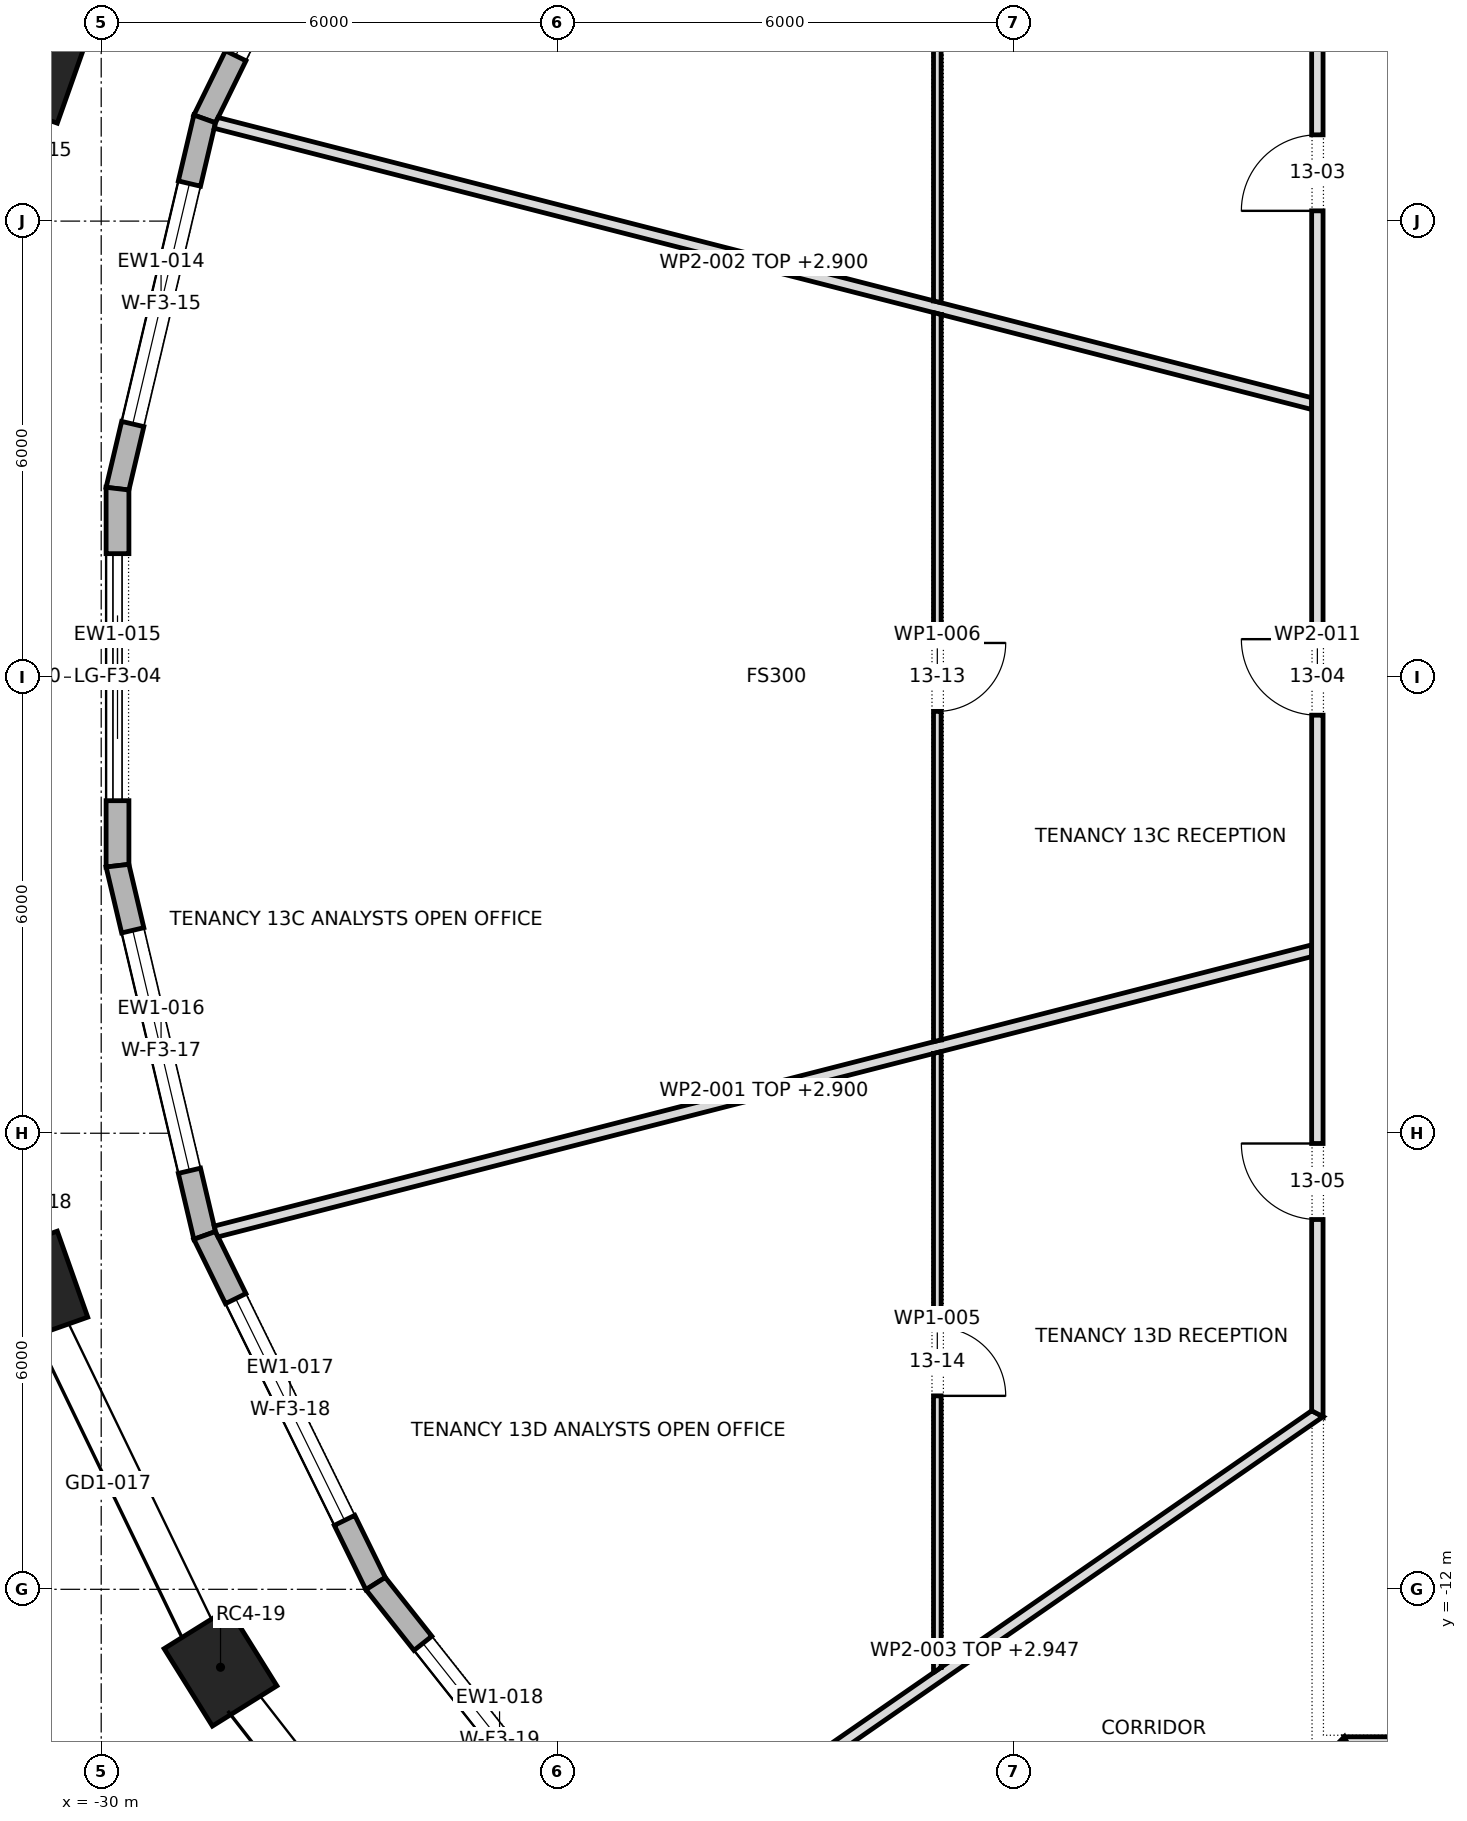
"""IFC4 building model, lengths in metres.
Left out: names, types, materials, properties, quantities, classifications, styles, units other than length and angle.
Written with IfcOpenShell. Run it as: python <this file> out.ifc"""

import sys

from ifc_helpers import new_model, si_unit, direction, frame, frame_2d, origin, origin_2d, place, context, subcontext, project, spatial, polyline, rectangle, outline, extrude, element, fill, save


model = new_model("IFC4")
c1 = context("Model", 3, precision=1e-05, world=origin(), true_north=direction((0.0, 1.0)))
c2 = subcontext(c1, "Body", "Model", "MODEL_VIEW")
j1 = project(units=[si_unit("LENGTHUNIT", "METRE"), si_unit("PLANEANGLEUNIT", "RADIAN")], contexts=[c1])
p1 = place(None, origin())
s1 = spatial("IfcSite", under=j1, at=p1, CompositionType="ELEMENT")
p2 = place(p1, origin())
s2 = spatial("IfcBuilding", under=s1, at=p2, CompositionType="ELEMENT")
p3 = place(p2, frame((0.0, 0.0, 198.9)))
s3 = spatial("IfcBuildingStorey", under=s2, at=p3, CompositionType="ELEMENT", Elevation=198.9)
for number, where, z_axis, x_axis in (
    (1, (-30.849, 8.021, 0.0), (0.0, 0.0, 1.0), (-0.334, -0.943, 0.0)),
    (2, (-30.849, -8.021, 0.0), (0.0, 0.0, 1.0), (0.334, -0.943, 0.0)),
    (3, (-28.43, -13.025, 0.0), (0.0, 0.0, 1.0), (0.529, -0.849, 0.0)),
):
    element("IfcColumn", number, at=place(p3, frame(where, z_axis=z_axis, x_axis=x_axis)), inside=s3, PredefinedType="COLUMN", context=c2, shape_type="SweptSolid", body=[
        extrude(rectangle(XDim=1.2, YDim=1.0, at=origin_2d()), origin(), (0.0, 0.0, 1.0), 4.0),
    ])
p4 = place(p3, frame((-26.39, 11.924, 0.0), z_axis=(0.0, 0.0, 1.0), x_axis=(-0.440694221881, -0.897657285829, 0.0)))
e4 = element("IfcWall", 4, at=p4, inside=s3, PredefinedType="STANDARD", context=c2, shape_type="SweptSolid", body=[
    extrude(outline(polyline([(-0.016, -0.15), (5.119, -0.15), (5.085, 0.15), (0.016, 0.15), (-0.016, -0.15)])), origin(), (0.0, 0.0, 1.0), 3.7),
])
p5 = place(p4, frame((0.926, 0.0, 0.6)))
e5 = element("IfcOpeningElement", 5, at=p5, cuts=e4, PredefinedType="OPENING", context=c2, shape_type="SweptSolid", body=[
    extrude(rectangle(XDim=3.25, YDim=2.65, at=frame_2d((1.625, 1.325))), frame((0.0, 0.162, 0.0), z_axis=(0.0, -1.0, 0.0), x_axis=(1.0, 0.0, 0.0)), (0.0, 0.0, 1.0), 0.324),
])
p6 = place(p3, frame((-28.639, 7.344, 0.0), z_axis=(0.0, 0.0, 1.0), x_axis=(-0.229455912692, -0.97331905567, 0.0)))
e6 = element("IfcWall", 6, at=p6, inside=s3, PredefinedType="STANDARD", context=c2, shape_type="SweptSolid", body=[
    extrude(outline(polyline([(-0.017, -0.15), (5.015, -0.15), (4.98, 0.15), (0.017, 0.15), (-0.017, -0.15)])), origin(), (0.0, 0.0, 1.0), 3.7),
])
p7 = place(p6, frame((0.874, 0.0, 0.6)))
e7 = element("IfcOpeningElement", 7, at=p7, cuts=e6, PredefinedType="OPENING", context=c2, shape_type="SweptSolid", body=[
    extrude(rectangle(XDim=3.25, YDim=2.65, at=frame_2d((1.625, 1.325))), frame((0.0, 0.162, 0.0), z_axis=(0.0, -1.0, 0.0), x_axis=(1.0, 0.0, 0.0)), (0.0, 0.0, 1.0), 0.324),
])
p8 = place(p3, frame((-29.785, 2.48, 0.0), z_axis=(0.0, 0.0, 1.0), x_axis=(0.0, -1.0, 0.0)))
e8 = element("IfcWall", 8, at=p8, inside=s3, PredefinedType="STANDARD", context=c2, shape_type="SweptSolid", body=[
    extrude(outline(polyline([(-0.017, -0.15), (4.977, -0.15), (4.943, 0.15), (0.017, 0.15), (-0.017, -0.15)])), origin(), (0.0, 0.0, 1.0), 3.7),
])
p9 = place(p8, frame((0.855, 0.0, 0.0)))
e9 = element("IfcOpeningElement", 9, at=p9, cuts=e8, PredefinedType="OPENING", context=c2, shape_type="SweptSolid", body=[
    extrude(rectangle(XDim=3.25, YDim=3.25, at=frame_2d((1.625, 1.625))), frame((0.0, 0.162, 0.0), z_axis=(0.0, -1.0, 0.0), x_axis=(1.0, 0.0, 0.0)), (0.0, 0.0, 1.0), 0.324),
])
p10 = place(p3, frame((-29.785, -2.48, 0.0), z_axis=(0.0, 0.0, 1.0), x_axis=(0.229455912692, -0.97331905567, 0.0)))
e10 = element("IfcWall", 10, at=p10, inside=s3, PredefinedType="STANDARD", context=c2, shape_type="SweptSolid", body=[
    extrude(outline(polyline([(-0.017, -0.15), (5.014, -0.15), (4.981, 0.15), (0.017, 0.15), (-0.017, -0.15)])), origin(), (0.0, 0.0, 1.0), 3.7),
])
p11 = place(p10, frame((0.874, 0.0, 0.6)))
e11 = element("IfcOpeningElement", 11, at=p11, cuts=e10, PredefinedType="OPENING", context=c2, shape_type="SweptSolid", body=[
    extrude(rectangle(XDim=3.25, YDim=2.65, at=frame_2d((1.625, 1.325))), frame((0.0, 0.162, 0.0), z_axis=(0.0, -1.0, 0.0), x_axis=(1.0, 0.0, 0.0)), (0.0, 0.0, 1.0), 0.324),
])
p12 = place(p3, frame((-28.639, -7.344, 0.0), z_axis=(0.0, 0.0, 1.0), x_axis=(0.440694221881, -0.897657285829, 0.0)))
e12 = element("IfcWall", 12, at=p12, inside=s3, PredefinedType="STANDARD", context=c2, shape_type="SweptSolid", body=[
    extrude(outline(polyline([(-0.017, -0.15), (5.118, -0.15), (5.086, 0.15), (0.017, 0.15), (-0.017, -0.15)])), origin(), (0.0, 0.0, 1.0), 3.7),
])
p13 = place(p12, frame((0.926, 0.0, 0.6)))
e13 = element("IfcOpeningElement", 13, at=p13, cuts=e12, PredefinedType="OPENING", context=c2, shape_type="SweptSolid", body=[
    extrude(rectangle(XDim=3.25, YDim=2.65, at=frame_2d((1.625, 1.325))), frame((0.0, 0.162, 0.0), z_axis=(0.0, -1.0, 0.0), x_axis=(1.0, 0.0, 0.0)), (0.0, 0.0, 1.0), 0.324),
])
p14 = place(p3, frame((-26.39, -11.924, 0.0), z_axis=(0.0, 0.0, 1.0), x_axis=(0.620829074232, -0.783945955145, 0.0)))
e14 = element("IfcWall", 14, at=p14, inside=s3, PredefinedType="STANDARD", context=c2, shape_type="SweptSolid", body=[
    extrude(outline(polyline([(-0.016, -0.15), (5.27, -0.15), (5.24, 0.15), (0.016, 0.15), (-0.016, -0.15)])), origin(), (0.0, 0.0, 1.0), 3.7),
])
p15 = place(p14, frame((1.003, 0.0, 0.6)))
e15 = element("IfcOpeningElement", 15, at=p15, cuts=e14, PredefinedType="OPENING", context=c2, shape_type="SweptSolid", body=[
    extrude(rectangle(XDim=3.25, YDim=2.65, at=frame_2d((1.625, 1.325))), frame((0.0, 0.162, 0.0), z_axis=(0.0, -1.0, 0.0), x_axis=(1.0, 0.0, 0.0)), (0.0, 0.0, 1.0), 0.324),
])
p16 = place(p3, frame((-28.494, -7.294, 0.0), z_axis=(0.0, 0.0, 1.0), x_axis=(0.96870063855, 0.248231893342, 0.0)))
e16 = element("IfcWall", 16, at=p16, inside=s3, PredefinedType="PARTITIONING", context=c2, shape_type="SweptSolid", body=[
    extrude(outline(polyline([(0.014, -0.075), (1.957, -0.075), (3.901, -0.075), (5.844, -0.075), (7.787, -0.075), (9.73, -0.075), (9.731, -0.073), (9.736, -0.075), (11.446, -0.075), (13.156, -0.075), (14.866, -0.075), (14.904, 0.074), (14.904, 0.075), (13.227, 0.075), (11.549, 0.075), (9.872, 0.075), (9.872, 0.073), (9.866, 0.075), (7.893, 0.075), (5.92, 0.075), (3.947, 0.075), (1.973, 0.075), (0.0, 0.075), (0.0, -0.008), (0.014, -0.075)])), origin(), (0.0, 0.0, 1.0), 2.9),
])
p17 = place(p3, frame((-28.494, 7.294, 0.0), z_axis=(0.0, 0.0, 1.0), x_axis=(0.96870063855, -0.248231893342, 0.0)))
e17 = element("IfcWall", 17, at=p17, inside=s3, PredefinedType="PARTITIONING", context=c2, shape_type="SweptSolid", body=[
    extrude(outline(polyline([(0.0, -0.075), (1.973, -0.075), (3.947, -0.075), (5.92, -0.075), (7.893, -0.075), (9.866, -0.075), (9.872, -0.073), (9.872, -0.075), (11.549, -0.075), (13.227, -0.075), (14.904, -0.075), (14.904, -0.074), (14.866, 0.075), (13.156, 0.075), (11.446, 0.075), (9.736, 0.075), (9.731, 0.073), (9.73, 0.075), (7.787, 0.075), (5.844, 0.075), (3.901, 0.075), (1.957, 0.075), (0.014, 0.075), (0.0, 0.008), (0.0, -0.075)])), origin(), (0.0, 0.0, 1.0), 2.9),
])
p18 = place(p3, frame((-23.024, -15.94, 0.0), z_axis=(0.0, 0.0, 1.0), x_axis=(0.822097241007, 0.569347105313, 0.0)))
e18 = element("IfcWall", 18, at=p18, inside=s3, PredefinedType="PARTITIONING", context=c2, shape_type="SweptSolid", body=[
    extrude(outline(polyline([(0.024, -0.075), (1.856, -0.075), (3.688, -0.075), (5.52, -0.075), (7.352, -0.075), (9.184, -0.075), (11.016, -0.075), (10.977, -0.0), (10.938, 0.075), (8.961, 0.075), (6.985, 0.075), (5.008, 0.075), (5.006, 0.072), (5.002, 0.075), (3.335, 0.075), (1.667, 0.075), (0.0, 0.075), (0.0, 0.068), (0.005, -0.002), (0.024, -0.075)])), origin(), (0.0, 0.0, 1.0), 2.947),
])
p19 = place(p3, frame((-19.0, -13.095, 0.0), z_axis=(0.0, 0.0, 1.0), x_axis=(0.0, 1.0, 0.0)))
e19 = element("IfcWall", 19, at=p19, inside=s3, PredefinedType="PARTITIONING", context=c2, shape_type="SweptSolid", body=[
    extrude(outline(polyline([(8.169, -0.05), (8.169, -0.049), (8.144, 0.05), (6.515, 0.05), (4.886, 0.05), (3.258, 0.05), (1.629, 0.05), (0.0, 0.05), (0.0, 0.049), (0.069, -0.05), (1.689, -0.05), (3.309, -0.05), (4.929, -0.05), (6.549, -0.05), (8.169, -0.05)])), origin(), (0.0, 0.0, 1.0), 3.7),
])
p20 = place(p19, frame((3.64, 0.0, 0.0)))
e20 = element("IfcOpeningElement", 20, at=p20, cuts=e19, PredefinedType="OPENING", context=c2, shape_type="SweptSolid", body=[
    extrude(rectangle(XDim=0.9, YDim=2.1, at=frame_2d((0.45, 1.05))), frame((0.0, 0.062, 0.0), z_axis=(0.0, -1.0, 0.0), x_axis=(1.0, 0.0, 0.0)), (0.0, 0.0, 1.0), 0.124),
])
p21 = place(p3, frame((-19.0, -4.796, 0.0), z_axis=(0.0, 0.0, 1.0), x_axis=(0.0, 1.0, 0.0)))
e21 = element("IfcWall", 21, at=p21, inside=s3, PredefinedType="PARTITIONING", context=c2, shape_type="SweptSolid", body=[
    extrude(outline(polyline([(0.025, -0.05), (1.934, -0.05), (3.842, -0.05), (5.75, -0.05), (7.659, -0.05), (9.567, -0.05), (9.593, 0.049), (9.593, 0.05), (7.674, 0.05), (5.756, 0.05), (3.837, 0.05), (1.918, 0.05), (0.0, 0.05), (0.0, 0.049), (0.025, -0.05)])), origin(), (0.0, 0.0, 1.0), 3.7),
])
p22 = place(p21, frame((4.346, 0.0, 0.0)))
e22 = element("IfcOpeningElement", 22, at=p22, cuts=e21, PredefinedType="OPENING", context=c2, shape_type="SweptSolid", body=[
    extrude(rectangle(XDim=0.9, YDim=2.1, at=frame_2d((0.45, 1.05))), frame((0.0, 0.062, 0.0), z_axis=(0.0, -1.0, 0.0), x_axis=(1.0, 0.0, 0.0)), (0.0, 0.0, 1.0), 0.124),
])
p23 = place(p3, frame((-19.0, 4.926, 0.0), z_axis=(0.0, 0.0, 1.0), x_axis=(0.0, 1.0, 0.0)))
e23 = element("IfcWall", 23, at=p23, inside=s3, PredefinedType="PARTITIONING", context=c2, shape_type="SweptSolid", body=[
    extrude(outline(polyline([(0.0, -0.05), (1.62, -0.05), (3.239, -0.05), (4.859, -0.05), (6.479, -0.05), (8.098, -0.05), (8.162, 0.043), (8.169, 0.038), (8.177, 0.05), (8.177, 0.05), (6.547, 0.05), (4.917, 0.05), (3.286, 0.05), (1.656, 0.05), (0.025, 0.05), (0.0, -0.049), (0.0, -0.05)])), origin(), (0.0, 0.0, 1.0), 3.7),
])
p24 = place(p23, frame((3.629, 0.0, 0.0)))
e24 = element("IfcOpeningElement", 24, at=p24, cuts=e23, PredefinedType="OPENING", context=c2, shape_type="SweptSolid", body=[
    extrude(rectangle(XDim=0.9, YDim=2.1, at=frame_2d((0.45, 1.05))), frame((0.0, 0.062, 0.0), z_axis=(0.0, -1.0, 0.0), x_axis=(1.0, 0.0, 0.0)), (0.0, 0.0, 1.0), 0.124),
])
p25 = place(p3, frame((-13.646, -14.0, 0.0), z_axis=(0.0, 0.0, 1.0), x_axis=(1.0, 0.0, 0.0)))
e25 = element("IfcWall", 25, at=p25, inside=s3, PredefinedType="PARTITIONING", context=c2, shape_type="SweptSolid", body=[
    extrude(outline(polyline([(12.016, 0.06), (10.299, 0.06), (8.583, 0.06), (6.866, 0.06), (5.15, 0.06), (3.433, 0.06), (1.717, 0.06), (0.0, 0.06), (0.051, -0.06), (2.045, -0.06), (4.039, -0.06), (6.033, -0.06), (8.027, -0.06), (10.021, -0.06), (12.016, -0.06), (12.016, 0.06)])), origin(), (0.0, 0.0, 1.0), 3.7),
])
p26 = place(p25, frame((5.521, 0.0, 0.0)))
e26 = element("IfcOpeningElement", 26, at=p26, cuts=e25, PredefinedType="OPENING", context=c2, shape_type="SweptSolid", body=[
    extrude(rectangle(XDim=1.0, YDim=2.1, at=frame_2d((0.5, 1.05))), frame((0.0, 0.072, 0.0), z_axis=(0.0, -1.0, 0.0), x_axis=(1.0, 0.0, 0.0)), (0.0, 0.0, 1.0), 0.144),
])
p27 = place(p3, frame((-14.0, -9.729, 0.0), z_axis=(0.0, 0.0, 1.0), x_axis=(0.0, 1.0, 0.0)))
e27 = element("IfcWall", 27, at=p27, inside=s3, PredefinedType="PARTITIONING", context=c2, shape_type="SweptSolid", body=[
    extrude(outline(polyline([(19.458, -0.075), (19.458, -0.075), (19.38, 0.075), (17.45, 0.075), (15.52, 0.075), (13.59, 0.075), (11.659, 0.075), (9.729, 0.075), (7.799, 0.075), (5.869, 0.075), (3.939, 0.075), (2.009, 0.075), (0.079, 0.075), (0.0, -0.075), (0.0, -0.075), (1.946, -0.075), (3.892, -0.075), (5.838, -0.075), (7.783, -0.075), (9.729, -0.075), (11.675, -0.075), (13.621, -0.075), (15.567, -0.075), (17.513, -0.075), (19.458, -0.075)])), origin(), (0.0, 0.0, 1.0), 3.7),
])
p28 = place(p27, frame((15.864, 0.0, 0.0)))
e28 = element("IfcOpeningElement", 28, at=p28, cuts=e27, PredefinedType="OPENING", context=c2, shape_type="SweptSolid", body=[
    extrude(rectangle(XDim=1.0, YDim=2.1, at=frame_2d((0.5, 1.05))), frame((0.0, 0.087, 0.0), z_axis=(0.0, -1.0, 0.0), x_axis=(1.0, 0.0, 0.0)), (0.0, 0.0, 1.0), 0.174),
])
p29 = place(p27, frame((9.229, 0.0, 0.0)))
e29 = element("IfcOpeningElement", 29, at=p29, cuts=e27, PredefinedType="OPENING", context=c2, shape_type="SweptSolid", body=[
    extrude(rectangle(XDim=1.0, YDim=2.1, at=frame_2d((0.5, 1.05))), frame((0.0, 0.087, 0.0), z_axis=(0.0, -1.0, 0.0), x_axis=(1.0, 0.0, 0.0)), (0.0, 0.0, 1.0), 0.174),
])
p30 = place(p27, frame((2.594, 0.0, 0.0)))
e30 = element("IfcOpeningElement", 30, at=p30, cuts=e27, PredefinedType="OPENING", context=c2, shape_type="SweptSolid", body=[
    extrude(rectangle(XDim=1.0, YDim=2.1, at=frame_2d((0.5, 1.05))), frame((0.0, 0.087, 0.0), z_axis=(0.0, -1.0, 0.0), x_axis=(1.0, 0.0, 0.0)), (0.0, 0.0, 1.0), 0.174),
])
p31 = place(p3, frame((-13.602, -13.982, 0.0), z_axis=(0.0, 0.0, 1.0), x_axis=(-0.69685470262, -0.717212328001, 0.0)))
e31 = element("IfcWall", 31, at=p31, inside=s3, PredefinedType="PARTITIONING", context=c2, shape_type="SweptSolid", body=[
    extrude(outline(polyline([(7.591, -0.06), (7.591, -0.058), (7.587, -0.003), (7.571, 0.06), (5.691, 0.06), (3.811, 0.06), (1.931, 0.06), (0.051, 0.06), (0.025, 0.0), (0.0, -0.06), (0.0, -0.06), (0.0, -0.06), (1.898, -0.06), (3.796, -0.06), (5.694, -0.06), (7.591, -0.06)])), origin(), (0.0, 0.0, 1.0), 3.7),
])
p32 = place(p5, origin())
e32 = element("IfcWindow", 32, at=p32, inside=s3, PartitioningType="TRIPLE_PANEL_VERTICAL", PredefinedType="WINDOW", context=c2, shape_type="SweptSolid", body=[
    extrude(rectangle(XDim=3.25, YDim=2.65, at=frame_2d((1.625, 1.325))), frame((0.0, 0.03, 0.0), z_axis=(0.0, -1.0, 0.0), x_axis=(1.0, 0.0, 0.0)), (0.0, 0.0, 1.0), 0.06),
])
fill(e5, e32)
p33 = place(p7, origin())
e33 = element("IfcWindow", 33, at=p33, inside=s3, PartitioningType="TRIPLE_PANEL_VERTICAL", PredefinedType="WINDOW", context=c2, shape_type="SweptSolid", body=[
    extrude(rectangle(XDim=3.25, YDim=2.65, at=frame_2d((1.625, 1.325))), frame((0.0, 0.03, 0.0), z_axis=(0.0, -1.0, 0.0), x_axis=(1.0, 0.0, 0.0)), (0.0, 0.0, 1.0), 0.06),
])
fill(e7, e33)
p34 = place(p9, origin())
e34 = element("IfcDoor", 34, at=p34, inside=s3, OperationType="DOUBLE_DOOR_SLIDING", PredefinedType="DOOR", context=c2, shape_type="SweptSolid", body=[
    extrude(rectangle(XDim=3.25, YDim=3.25, at=frame_2d((1.625, 1.625))), frame((0.0, 0.025, 0.0), z_axis=(0.0, -1.0, 0.0), x_axis=(1.0, 0.0, 0.0)), (0.0, 0.0, 1.0), 0.05),
])
fill(e9, e34)
p35 = place(p11, origin())
e35 = element("IfcWindow", 35, at=p35, inside=s3, PartitioningType="TRIPLE_PANEL_VERTICAL", PredefinedType="WINDOW", context=c2, shape_type="SweptSolid", body=[
    extrude(rectangle(XDim=3.25, YDim=2.65, at=frame_2d((1.625, 1.325))), frame((0.0, 0.03, 0.0), z_axis=(0.0, -1.0, 0.0), x_axis=(1.0, 0.0, 0.0)), (0.0, 0.0, 1.0), 0.06),
])
fill(e11, e35)
p36 = place(p13, origin())
e36 = element("IfcWindow", 36, at=p36, inside=s3, PartitioningType="TRIPLE_PANEL_VERTICAL", PredefinedType="WINDOW", context=c2, shape_type="SweptSolid", body=[
    extrude(rectangle(XDim=3.25, YDim=2.65, at=frame_2d((1.625, 1.325))), frame((0.0, 0.03, 0.0), z_axis=(0.0, -1.0, 0.0), x_axis=(1.0, 0.0, 0.0)), (0.0, 0.0, 1.0), 0.06),
])
fill(e13, e36)
p37 = place(p15, origin())
e37 = element("IfcWindow", 37, at=p37, inside=s3, PartitioningType="TRIPLE_PANEL_VERTICAL", PredefinedType="WINDOW", context=c2, shape_type="SweptSolid", body=[
    extrude(rectangle(XDim=3.25, YDim=2.65, at=frame_2d((1.625, 1.325))), frame((0.0, 0.03, 0.0), z_axis=(0.0, -1.0, 0.0), x_axis=(1.0, 0.0, 0.0)), (0.0, 0.0, 1.0), 0.06),
])
fill(e15, e37)
p38 = place(p28, origin())
e38 = element("IfcDoor", 38, at=p38, inside=s3, OperationType="SINGLE_SWING_RIGHT", PredefinedType="DOOR", context=c2, shape_type="SweptSolid", body=[
    extrude(rectangle(XDim=1.0, YDim=2.1, at=frame_2d((0.5, 1.05))), frame((0.0, 0.025, 0.0), z_axis=(0.0, -1.0, 0.0), x_axis=(1.0, 0.0, 0.0)), (0.0, 0.0, 1.0), 0.05),
])
fill(e28, e38)
p39 = place(p29, origin())
e39 = element("IfcDoor", 39, at=p39, inside=s3, OperationType="SINGLE_SWING_LEFT", PredefinedType="DOOR", context=c2, shape_type="SweptSolid", body=[
    extrude(rectangle(XDim=1.0, YDim=2.1, at=frame_2d((0.5, 1.05))), frame((0.0, 0.025, 0.0), z_axis=(0.0, -1.0, 0.0), x_axis=(1.0, 0.0, 0.0)), (0.0, 0.0, 1.0), 0.05),
])
fill(e29, e39)
p40 = place(p30, origin())
e40 = element("IfcDoor", 40, at=p40, inside=s3, OperationType="SINGLE_SWING_LEFT", PredefinedType="DOOR", context=c2, shape_type="SweptSolid", body=[
    extrude(rectangle(XDim=1.0, YDim=2.1, at=frame_2d((0.5, 1.05))), frame((0.0, 0.025, 0.0), z_axis=(0.0, -1.0, 0.0), x_axis=(1.0, 0.0, 0.0)), (0.0, 0.0, 1.0), 0.05),
])
fill(e30, e40)
p41 = place(p22, frame((0.9, 0.0, 0.0), z_axis=(0.0, 0.0, 1.0), x_axis=(-1.0, 0.0, 0.0)))
e41 = element("IfcDoor", 41, at=p41, inside=s3, OperationType="SINGLE_SWING_RIGHT", PredefinedType="DOOR", context=c2, shape_type="SweptSolid", body=[
    extrude(rectangle(XDim=0.9, YDim=2.1, at=frame_2d((0.45, 1.05))), frame((0.0, 0.025, 0.0), z_axis=(0.0, -1.0, 0.0), x_axis=(1.0, 0.0, 0.0)), (0.0, 0.0, 1.0), 0.05),
])
fill(e22, e41)
p42 = place(p20, frame((0.9, 0.0, 0.0), z_axis=(0.0, 0.0, 1.0), x_axis=(-1.0, 0.0, 0.0)))
e42 = element("IfcDoor", 42, at=p42, inside=s3, OperationType="SINGLE_SWING_LEFT", PredefinedType="DOOR", context=c2, shape_type="SweptSolid", body=[
    extrude(rectangle(XDim=0.9, YDim=2.1, at=frame_2d((0.45, 1.05))), frame((0.0, 0.025, 0.0), z_axis=(0.0, -1.0, 0.0), x_axis=(1.0, 0.0, 0.0)), (0.0, 0.0, 1.0), 0.05),
])
fill(e20, e42)
save(model, sys.argv[1])
